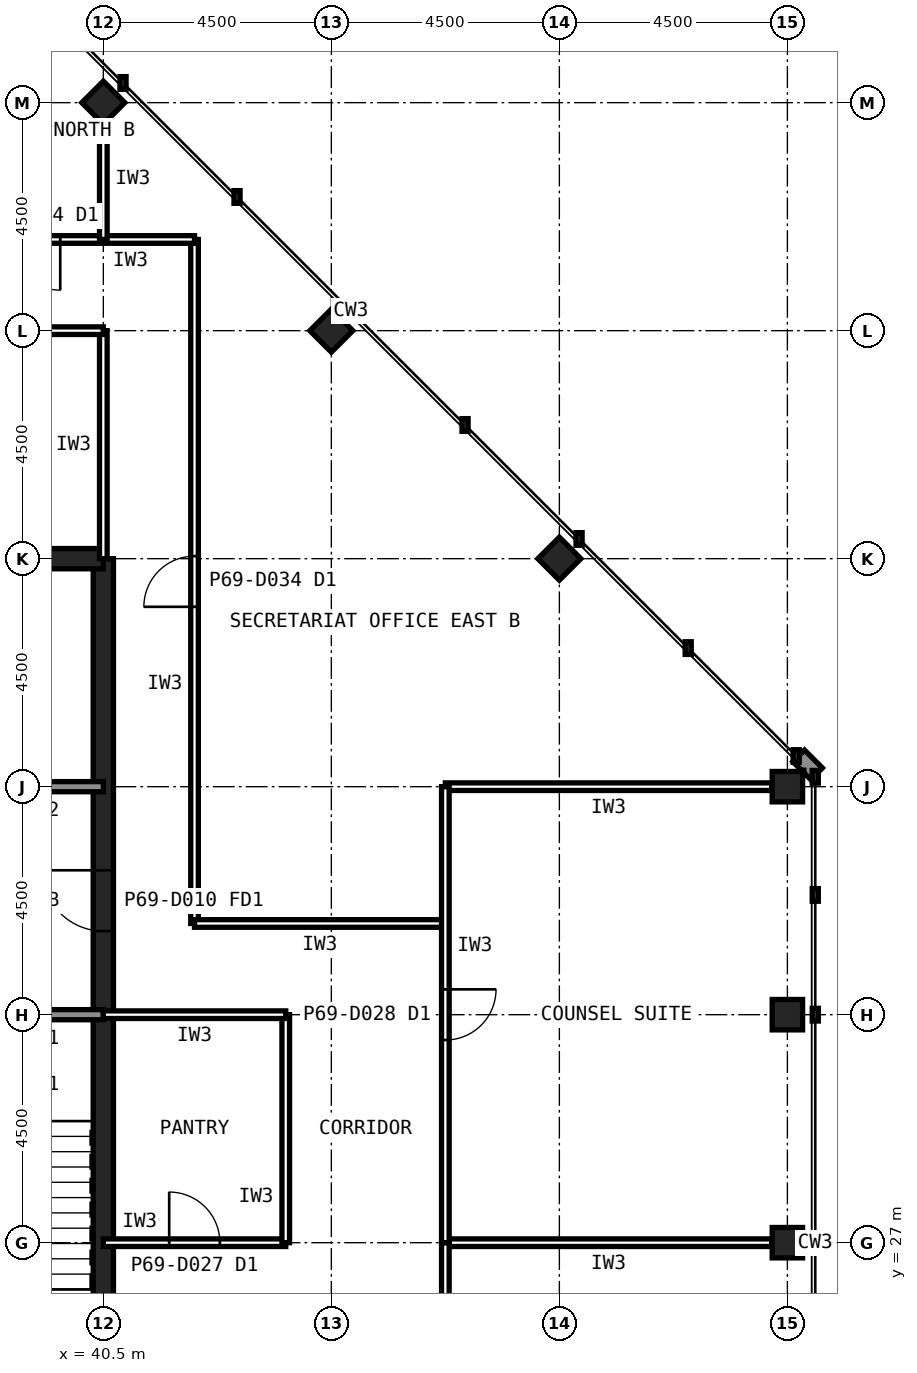
"""IFC4 building model, lengths in metres.
Left out: names, types, materials, properties, quantities, classifications, styles, units other than length and angle.
Written with IfcOpenShell. Run it as: python <this file> out.ifc"""

import sys

from ifc_helpers import new_model, si_unit, direction, frame, frame_2d, origin, origin_2d, place, context, subcontext, project, spatial, rectangle, hollow_rectangle, extrude, element, fill, save


model = new_model("IFC4")
c1 = context("Model", 3, precision=1e-05, world=origin(), true_north=direction((0.0, 1.0)))
c2 = subcontext(c1, "Body", "Model", "MODEL_VIEW")
j1 = project(units=[si_unit("LENGTHUNIT", "METRE"), si_unit("PLANEANGLEUNIT", "RADIAN")], contexts=[c1])
p1 = place(None, origin())
s1 = spatial("IfcSite", under=j1, at=p1, CompositionType="ELEMENT")
p2 = place(p1, origin())
s2 = spatial("IfcBuilding", under=s1, at=p2, CompositionType="ELEMENT")
p3 = place(p2, frame((0.0, 0.0, 286.6)))
s3 = spatial("IfcBuildingStorey", under=s2, at=p3, CompositionType="ELEMENT", Elevation=286.6)
for number, where, z_axis, x_axis in (
    (1, (54.0, 27.0, 0.0), (0.0, 0.0, 1.0), (1.0, 0.0, 0.0)),
    (2, (54.0, 31.5, 0.0), (0.0, 0.0, 1.0), (1.0, 0.0, 0.0)),
    (3, (54.0, 36.0, 0.0), (0.0, 0.0, 1.0), (1.0, 0.0, 0.0)),
    (4, (49.5, 40.5, 0.0), (0.0, 0.0, 1.0), (0.707, 0.707, 0.0)),
    (5, (45.0, 45.0, 0.0), (0.0, 0.0, 1.0), (0.707, 0.707, 0.0)),
    (6, (40.5, 49.5, 0.0), (0.0, 0.0, 1.0), (0.707, 0.707, 0.0)),
):
    element("IfcColumn", number, at=place(p3, frame(where, z_axis=z_axis, x_axis=x_axis)), inside=s3, PredefinedType="COLUMN", context=c2, shape_type="SweptSolid", body=[
        extrude(hollow_rectangle(XDim=0.6, YDim=0.6, WallThickness=0.028, at=origin_2d()), origin(), (0.0, 0.0, 1.0), 4.0),
    ])
p4 = place(p3, frame((40.5, 13.5, 0.0), z_axis=(0.0, 0.0, 1.0), x_axis=(0.0, 1.0, 0.0)))
e7 = element("IfcWall", 7, at=p4, inside=s3, PredefinedType="SHEAR", context=c2, shape_type="SweptSolid", body=[
    extrude(rectangle(XDim=27.0, YDim=0.4, at=frame_2d((13.5, 0.0))), origin(), (0.0, 0.0, 1.0), 4.0),
])
p5 = place(p4, frame((5.85, 0.0, 0.0)))
e8 = element("IfcOpeningElement", 8, at=p5, cuts=e7, PredefinedType="OPENING", context=c2, shape_type="SweptSolid", body=[
    extrude(rectangle(XDim=1.8, YDim=2.1, at=frame_2d((0.9, 1.05))), frame((0.0, 0.21, 0.0), z_axis=(0.0, -1.0, 0.0), x_axis=(1.0, 0.0, 0.0)), (0.0, 0.0, 1.0), 0.42),
])
p6 = place(p4, frame((19.65, 0.0, 0.0)))
e9 = element("IfcOpeningElement", 9, at=p6, cuts=e7, PredefinedType="OPENING", context=c2, shape_type="SweptSolid", body=[
    extrude(rectangle(XDim=1.2, YDim=2.1, at=frame_2d((0.6, 1.05))), frame((0.0, 0.21, 0.0), z_axis=(0.0, -1.0, 0.0), x_axis=(1.0, 0.0, 0.0)), (0.0, 0.0, 1.0), 0.42),
])
p7 = place(p3, frame((40.5, 40.5, 0.0), z_axis=(0.0, 0.0, 1.0), x_axis=(-1.0, 0.0, 0.0)))
e10 = element("IfcWall", 10, at=p7, inside=s3, PredefinedType="SHEAR", context=c2, shape_type="SweptSolid", body=[
    extrude(rectangle(XDim=27.0, YDim=0.4, at=frame_2d((13.5, 0.0))), origin(), (0.0, 0.0, 1.0), 4.0),
])
p8 = place(p3, frame((13.5, 36.0, 0.0), z_axis=(0.0, 0.0, 1.0), x_axis=(1.0, 0.0, 0.0)))
e11 = element("IfcWall", 11, at=p8, inside=s3, PredefinedType="SOLIDWALL", context=c2, shape_type="SweptSolid", body=[
    extrude(rectangle(XDim=27.0, YDim=0.2, at=frame_2d((13.5, 0.0))), origin(), (0.0, 0.0, 1.0), 3.84),
])
p9 = place(p8, frame((1.8, 0.0, 0.0)))
e12 = element("IfcOpeningElement", 12, at=p9, cuts=e11, PredefinedType="OPENING", context=c2, shape_type="SweptSolid", body=[
    extrude(rectangle(XDim=0.9, YDim=2.1, at=frame_2d((0.45, 1.05))), frame((0.0, 0.11, 0.0), z_axis=(0.0, -1.0, 0.0), x_axis=(1.0, 0.0, 0.0)), (0.0, 0.0, 1.0), 0.22),
])
p10 = place(p8, frame((5.55, 0.0, 0.0)))
e13 = element("IfcOpeningElement", 13, at=p10, cuts=e11, PredefinedType="OPENING", context=c2, shape_type="SweptSolid", body=[
    extrude(rectangle(XDim=0.9, YDim=2.1, at=frame_2d((0.45, 1.05))), frame((0.0, 0.11, 0.0), z_axis=(0.0, -1.0, 0.0), x_axis=(1.0, 0.0, 0.0)), (0.0, 0.0, 1.0), 0.22),
])
p11 = place(p8, frame((14.55, 0.0, 0.0)))
e14 = element("IfcOpeningElement", 14, at=p11, cuts=e11, PredefinedType="OPENING", context=c2, shape_type="SweptSolid", body=[
    extrude(rectangle(XDim=0.9, YDim=2.1, at=frame_2d((0.45, 1.05))), frame((0.0, 0.11, 0.0), z_axis=(0.0, -1.0, 0.0), x_axis=(1.0, 0.0, 0.0)), (0.0, 0.0, 1.0), 0.22),
])
p12 = place(p8, frame((17.55, 0.0, 0.0)))
e15 = element("IfcOpeningElement", 15, at=p12, cuts=e11, PredefinedType="OPENING", context=c2, shape_type="SweptSolid", body=[
    extrude(rectangle(XDim=0.9, YDim=2.1, at=frame_2d((0.45, 1.05))), frame((0.0, 0.11, 0.0), z_axis=(0.0, -1.0, 0.0), x_axis=(1.0, 0.0, 0.0)), (0.0, 0.0, 1.0), 0.22),
])
p13 = place(p8, frame((24.1, 0.0, 0.0)))
e16 = element("IfcOpeningElement", 16, at=p13, cuts=e11, PredefinedType="OPENING", context=c2, shape_type="SweptSolid", body=[
    extrude(rectangle(XDim=1.3, YDim=2.2, at=frame_2d((0.65, 1.1))), frame((0.0, 0.11, 0.0), z_axis=(0.0, -1.0, 0.0), x_axis=(1.0, 0.0, 0.0)), (0.0, 0.0, 1.0), 0.22),
])
p14 = place(p3, frame((13.5, 31.5, 0.0), z_axis=(0.0, 0.0, 1.0), x_axis=(1.0, 0.0, 0.0)))
e17 = element("IfcWall", 17, at=p14, inside=s3, PredefinedType="SOLIDWALL", context=c2, shape_type="SweptSolid", body=[
    extrude(rectangle(XDim=27.0, YDim=0.2, at=frame_2d((13.5, 0.0))), origin(), (0.0, 0.0, 1.0), 3.84),
])
p15 = place(p14, frame((24.15, 0.0, 0.0)))
e18 = element("IfcOpeningElement", 18, at=p15, cuts=e17, PredefinedType="OPENING", context=c2, shape_type="SweptSolid", body=[
    extrude(rectangle(XDim=1.2, YDim=2.1, at=frame_2d((0.6, 1.05))), frame((0.0, 0.11, 0.0), z_axis=(0.0, -1.0, 0.0), x_axis=(1.0, 0.0, 0.0)), (0.0, 0.0, 1.0), 0.22),
])
p16 = place(p14, frame((15.3, 0.0, 0.0)))
e19 = element("IfcOpeningElement", 19, at=p16, cuts=e17, PredefinedType="OPENING", context=c2, shape_type="SweptSolid", body=[
    extrude(rectangle(XDim=0.9, YDim=2.1, at=frame_2d((0.45, 1.05))), frame((0.0, 0.11, 0.0), z_axis=(0.0, -1.0, 0.0), x_axis=(1.0, 0.0, 0.0)), (0.0, 0.0, 1.0), 0.22),
])
p17 = place(p14, frame((19.8, 0.0, 0.0)))
e20 = element("IfcOpeningElement", 20, at=p17, cuts=e17, PredefinedType="OPENING", context=c2, shape_type="SweptSolid", body=[
    extrude(rectangle(XDim=0.9, YDim=2.1, at=frame_2d((0.45, 1.05))), frame((0.0, 0.11, 0.0), z_axis=(0.0, -1.0, 0.0), x_axis=(1.0, 0.0, 0.0)), (0.0, 0.0, 1.0), 0.22),
])
p18 = place(p3, frame((42.3, 33.3, 0.0), z_axis=(0.0, 0.0, 1.0), x_axis=(0.0, 1.0, 0.0)))
e21 = element("IfcWall", 21, at=p18, inside=s3, PredefinedType="PARTITIONING", context=c2, shape_type="SweptSolid", body=[
    extrude(rectangle(XDim=13.5, YDim=0.15, at=frame_2d((6.75, 0.0))), origin(), (0.0, 0.0, 1.0), 3.84),
])
p19 = place(p18, frame((6.25, 0.0, 0.0)))
e22 = element("IfcOpeningElement", 22, at=p19, cuts=e21, PredefinedType="OPENING", context=c2, shape_type="SweptSolid", body=[
    extrude(rectangle(XDim=1.0, YDim=2.1, at=frame_2d((0.5, 1.05))), frame((0.0, 0.085, 0.0), z_axis=(0.0, -1.0, 0.0), x_axis=(1.0, 0.0, 0.0)), (0.0, 0.0, 1.0), 0.17),
])
p20 = place(p3, frame((42.3, 46.8, 0.0), z_axis=(0.0, 0.0, 1.0), x_axis=(-1.0, 0.0, 0.0)))
e23 = element("IfcWall", 23, at=p20, inside=s3, PredefinedType="PARTITIONING", context=c2, shape_type="SweptSolid", body=[
    extrude(rectangle(XDim=6.3, YDim=0.15, at=frame_2d((3.15, 0.0))), origin(), (0.0, 0.0, 1.0), 3.84),
])
p21 = place(p20, frame((2.65, 0.0, 0.0)))
e24 = element("IfcOpeningElement", 24, at=p21, cuts=e23, PredefinedType="OPENING", context=c2, shape_type="SweptSolid", body=[
    extrude(rectangle(XDim=1.0, YDim=2.1, at=frame_2d((0.5, 1.05))), frame((0.0, 0.085, 0.0), z_axis=(0.0, -1.0, 0.0), x_axis=(1.0, 0.0, 0.0)), (0.0, 0.0, 1.0), 0.17),
])
p22 = place(p3, frame((47.25, 33.3, 0.0), z_axis=(0.0, 0.0, 1.0), x_axis=(-1.0, 0.0, 0.0)))
e25 = element("IfcWall", 25, at=p22, inside=s3, PredefinedType="PARTITIONING", context=c2, shape_type="SweptSolid", body=[
    extrude(rectangle(XDim=4.95, YDim=0.15, at=frame_2d((2.475, 0.0))), origin(), (0.0, 0.0, 1.0), 3.84),
])
p23 = place(p3, frame((40.5, 40.5, 0.0), z_axis=(0.0, 0.0, 1.0), x_axis=(0.0, 1.0, 0.0)))
e26 = element("IfcWall", 26, at=p23, inside=s3, PredefinedType="PARTITIONING", context=c2, shape_type="SweptSolid", body=[
    extrude(rectangle(XDim=4.5, YDim=0.15, at=frame_2d((2.25, 0.0))), origin(), (0.0, 0.0, 1.0), 2.989),
])
p24 = place(p3, frame((40.5, 45.0, 0.0), z_axis=(0.0, 0.0, 1.0), x_axis=(-1.0, 0.0, 0.0)))
e27 = element("IfcWall", 27, at=p24, inside=s3, PredefinedType="PARTITIONING", context=c2, shape_type="SweptSolid", body=[
    extrude(rectangle(XDim=9.0, YDim=0.15, at=frame_2d((4.5, 0.0))), origin(), (0.0, 0.0, 1.0), 3.84),
])
p25 = place(p3, frame((40.5, 27.0, 0.0), z_axis=(0.0, 0.0, 1.0), x_axis=(1.0, 0.0, 0.0)))
e28 = element("IfcWall", 28, at=p25, inside=s3, PredefinedType="PARTITIONING", context=c2, shape_type="SweptSolid", body=[
    extrude(rectangle(XDim=3.6, YDim=0.15, at=frame_2d((1.8, 0.0))), origin(), (0.0, 0.0, 1.0), 2.989),
])
p26 = place(p25, frame((1.3, 0.0, 0.0)))
e29 = element("IfcOpeningElement", 29, at=p26, cuts=e28, PredefinedType="OPENING", context=c2, shape_type="SweptSolid", body=[
    extrude(rectangle(XDim=1.0, YDim=2.1, at=frame_2d((0.5, 1.05))), frame((0.0, 0.085, 0.0), z_axis=(0.0, -1.0, 0.0), x_axis=(1.0, 0.0, 0.0)), (0.0, 0.0, 1.0), 0.17),
])
p27 = place(p3, frame((44.1, 27.0, 0.0), z_axis=(0.0, 0.0, 1.0), x_axis=(0.0, 1.0, 0.0)))
e30 = element("IfcWall", 30, at=p27, inside=s3, PredefinedType="PARTITIONING", context=c2, shape_type="SweptSolid", body=[
    extrude(rectangle(XDim=4.5, YDim=0.15, at=frame_2d((2.25, 0.0))), origin(), (0.0, 0.0, 1.0), 3.84),
])
p28 = place(p3, frame((44.1, 31.5, 0.0), z_axis=(0.0, 0.0, 1.0), x_axis=(-1.0, 0.0, 0.0)))
e31 = element("IfcWall", 31, at=p28, inside=s3, PredefinedType="PARTITIONING", context=c2, shape_type="SweptSolid", body=[
    extrude(rectangle(XDim=3.6, YDim=0.15, at=frame_2d((1.8, 0.0))), origin(), (0.0, 0.0, 1.0), 2.989),
])
p29 = place(p3, frame((53.69, 27.0, 0.0), z_axis=(0.0, 0.0, 1.0), x_axis=(-1.0, 0.0, 0.0)))
e32 = element("IfcWall", 32, at=p29, inside=s3, PredefinedType="PARTITIONING", context=c2, shape_type="SweptSolid", body=[
    extrude(rectangle(XDim=6.44, YDim=0.15, at=frame_2d((3.22, 0.0))), origin(), (0.0, 0.0, 1.0), 2.989),
])
p30 = place(p3, frame((47.25, 27.0, 0.0), z_axis=(0.0, 0.0, 1.0), x_axis=(0.0, -1.0, 0.0)))
e33 = element("IfcWall", 33, at=p30, inside=s3, PredefinedType="PARTITIONING", context=c2, shape_type="SweptSolid", body=[
    extrude(rectangle(XDim=9.0, YDim=0.15, at=frame_2d((4.5, 0.0))), origin(), (0.0, 0.0, 1.0), 3.84),
])
p31 = place(p30, frame((4.0, 0.0, 0.0)))
e34 = element("IfcOpeningElement", 34, at=p31, cuts=e33, PredefinedType="OPENING", context=c2, shape_type="SweptSolid", body=[
    extrude(rectangle(XDim=1.0, YDim=2.1, at=frame_2d((0.5, 1.05))), frame((0.0, 0.085, 0.0), z_axis=(0.0, -1.0, 0.0), x_axis=(1.0, 0.0, 0.0)), (0.0, 0.0, 1.0), 0.17),
])
p32 = place(p3, frame((53.69, 36.0, 0.0), z_axis=(0.0, 0.0, 1.0), x_axis=(-1.0, 0.0, 0.0)))
e35 = element("IfcWall", 35, at=p32, inside=s3, PredefinedType="PARTITIONING", context=c2, shape_type="SweptSolid", body=[
    extrude(rectangle(XDim=6.44, YDim=0.15, at=frame_2d((3.22, 0.0))), origin(), (0.0, 0.0, 1.0), 2.989),
])
p33 = place(p3, frame((47.25, 36.0, 0.0), z_axis=(0.0, 0.0, 1.0), x_axis=(0.0, -1.0, 0.0)))
e36 = element("IfcWall", 36, at=p33, inside=s3, PredefinedType="PARTITIONING", context=c2, shape_type="SweptSolid", body=[
    extrude(rectangle(XDim=9.0, YDim=0.15, at=frame_2d((4.5, 0.0))), origin(), (0.0, 0.0, 1.0), 3.84),
])
p34 = place(p33, frame((4.0, 0.0, 0.0)))
e37 = element("IfcOpeningElement", 37, at=p34, cuts=e36, PredefinedType="OPENING", context=c2, shape_type="SweptSolid", body=[
    extrude(rectangle(XDim=1.0, YDim=2.1, at=frame_2d((0.5, 1.05))), frame((0.0, 0.085, 0.0), z_axis=(0.0, -1.0, 0.0), x_axis=(1.0, 0.0, 0.0)), (0.0, 0.0, 1.0), 0.17),
])
p35 = place(p3, frame((40.5, 49.18, 0.0), z_axis=(0.0, 0.0, 1.0), x_axis=(0.0, -1.0, 0.0)))
e38 = element("IfcWall", 38, at=p35, inside=s3, PredefinedType="PARTITIONING", context=c2, shape_type="SweptSolid", body=[
    extrude(rectangle(XDim=2.38, YDim=0.15, at=frame_2d((1.19, 0.0))), origin(), (0.0, 0.0, 1.0), 2.989),
])
p36 = place(p6, origin())
e39 = element("IfcDoor", 39, at=p36, inside=s3, OperationType="SINGLE_SWING_RIGHT", PredefinedType="DOOR", context=c2, shape_type="SweptSolid", body=[
    extrude(rectangle(XDim=1.2, YDim=2.1, at=frame_2d((0.6, 1.05))), frame((0.0, 0.025, 0.0), z_axis=(0.0, -1.0, 0.0), x_axis=(1.0, 0.0, 0.0)), (0.0, 0.0, 1.0), 0.05),
])
fill(e9, e39)
p37 = place(p21, origin())
e40 = element("IfcDoor", 40, at=p37, inside=s3, OperationType="SINGLE_SWING_LEFT", PredefinedType="DOOR", context=c2, shape_type="SweptSolid", body=[
    extrude(rectangle(XDim=1.0, YDim=2.1, at=frame_2d((0.5, 1.05))), frame((0.0, 0.025, 0.0), z_axis=(0.0, -1.0, 0.0), x_axis=(1.0, 0.0, 0.0)), (0.0, 0.0, 1.0), 0.05),
])
fill(e24, e40)
p38 = place(p19, origin())
e41 = element("IfcDoor", 41, at=p38, inside=s3, OperationType="SINGLE_SWING_LEFT", PredefinedType="DOOR", context=c2, shape_type="SweptSolid", body=[
    extrude(rectangle(XDim=1.0, YDim=2.1, at=frame_2d((0.5, 1.05))), frame((0.0, 0.025, 0.0), z_axis=(0.0, -1.0, 0.0), x_axis=(1.0, 0.0, 0.0)), (0.0, 0.0, 1.0), 0.05),
])
fill(e22, e41)
p39 = place(p26, origin())
e42 = element("IfcDoor", 42, at=p39, inside=s3, OperationType="SINGLE_SWING_LEFT", PredefinedType="DOOR", context=c2, shape_type="SweptSolid", body=[
    extrude(rectangle(XDim=1.0, YDim=2.1, at=frame_2d((0.5, 1.05))), frame((0.0, 0.025, 0.0), z_axis=(0.0, -1.0, 0.0), x_axis=(1.0, 0.0, 0.0)), (0.0, 0.0, 1.0), 0.05),
])
fill(e29, e42)
p40 = place(p34, origin())
e43 = element("IfcDoor", 43, at=p40, inside=s3, OperationType="SINGLE_SWING_LEFT", PredefinedType="DOOR", context=c2, shape_type="SweptSolid", body=[
    extrude(rectangle(XDim=1.0, YDim=2.1, at=frame_2d((0.5, 1.05))), frame((0.0, 0.025, 0.0), z_axis=(0.0, -1.0, 0.0), x_axis=(1.0, 0.0, 0.0)), (0.0, 0.0, 1.0), 0.05),
])
fill(e37, e43)
save(model, sys.argv[1])
